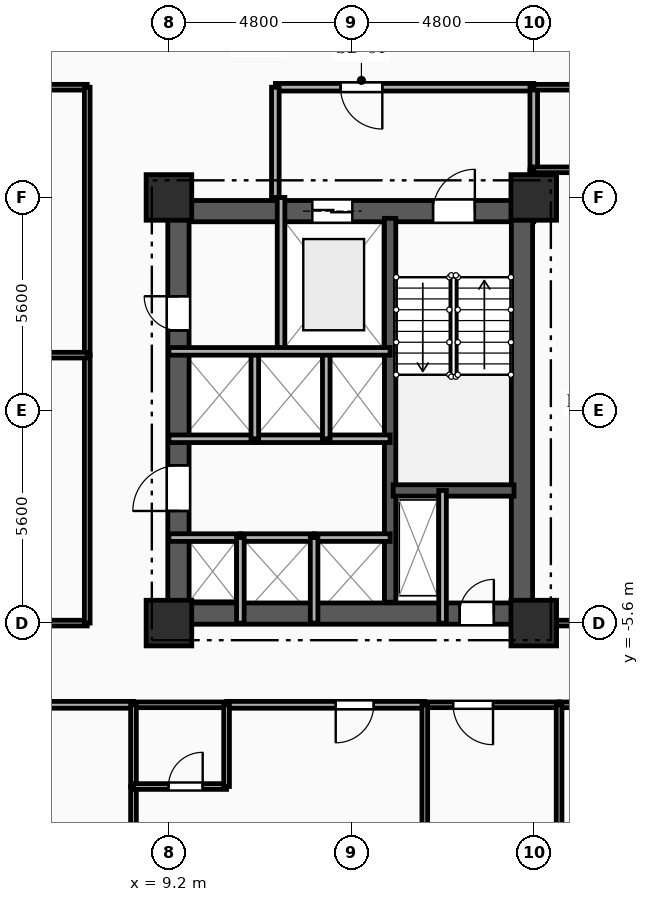
"""IFC4 building model, lengths in metres.
Left out: names, types, materials, properties, quantities, classifications, styles, units other than length and angle.
Written with IfcOpenShell. Run it as: python <this file> out.ifc"""

import sys

from ifc_helpers import new_model, si_unit, direction, frame, frame_2d, origin, origin_2d, place, context, subcontext, project, spatial, rectangle, extrude, element, fill, save


model = new_model("IFC4")
c1 = context("Model", 3, precision=1e-05, world=origin(), true_north=direction((0.0, 1.0)))
c2 = subcontext(c1, "Body", "Model", "MODEL_VIEW")
j1 = project(units=[si_unit("LENGTHUNIT", "METRE"), si_unit("PLANEANGLEUNIT", "RADIAN")], contexts=[c1])
p1 = place(None, origin())
s1 = spatial("IfcSite", under=j1, at=p1, CompositionType="ELEMENT")
p2 = place(p1, origin())
s2 = spatial("IfcBuilding", under=s1, at=p2, CompositionType="ELEMENT")
p3 = place(p2, frame((0.0, 0.0, 40.4)))
s3 = spatial("IfcBuildingStorey", under=s2, at=p3, CompositionType="ELEMENT", Elevation=40.4)
for number, where, z_axis, x_axis in (
    (1, (9.2, -5.6, 0.0), (0.0, 0.0, 1.0), (1.0, 0.0, 0.0)),
    (2, (9.2, 5.6, 0.0), (0.0, 0.0, 1.0), (1.0, 0.0, 0.0)),
    (3, (18.8, -5.6, 0.0), (0.0, 0.0, 1.0), (1.0, 0.0, 0.0)),
    (4, (18.8, 5.6, 0.0), (0.0, 0.0, 1.0), (1.0, 0.0, 0.0)),
):
    element("IfcColumn", number, at=place(p3, frame(where, z_axis=z_axis, x_axis=x_axis)), inside=s3, PredefinedType="COLUMN", context=c2, shape_type="SweptSolid", body=[
        extrude(rectangle(XDim=1.2, YDim=1.2, at=origin_2d()), origin(), (0.0, 0.0, 1.0), 3.35),
    ])
p4 = place(p3, frame((9.2, 5.24, 0.0), z_axis=(0.0, 0.0, 1.0), x_axis=(1.0, 0.0, 0.0)))
e5 = element("IfcWall", 5, at=p4, inside=s3, PredefinedType="SHEAR", context=c2, shape_type="SweptSolid", body=[
    extrude(rectangle(XDim=9.6, YDim=0.56, at=frame_2d((4.8, 0.0))), origin(), (0.0, 0.0, 1.0), 3.035),
])
p5 = place(p4, frame((6.95, 0.0, 0.0)))
e6 = element("IfcOpeningElement", 6, at=p5, cuts=e5, PredefinedType="OPENING", context=c2, shape_type="SweptSolid", body=[
    extrude(rectangle(XDim=1.1, YDim=2.15, at=frame_2d((0.55, 1.075))), frame((0.0, 0.29, 0.0), z_axis=(0.0, -1.0, 0.0), x_axis=(1.0, 0.0, 0.0)), (0.0, 0.0, 1.0), 0.58),
])
p6 = place(p4, frame((3.775, 0.0, 0.0)))
e7 = element("IfcOpeningElement", 7, at=p6, cuts=e5, PredefinedType="OPENING", context=c2, shape_type="SweptSolid", body=[
    extrude(rectangle(XDim=1.05, YDim=2.1, at=frame_2d((0.525, 1.05))), frame((0.0, 0.29, 0.0), z_axis=(0.0, -1.0, 0.0), x_axis=(1.0, 0.0, 0.0)), (0.0, 0.0, 1.0), 0.58),
])
p7 = place(p3, frame((9.2, -5.35, 0.0), z_axis=(0.0, 0.0, 1.0), x_axis=(1.0, 0.0, 0.0)))
e8 = element("IfcWall", 8, at=p7, inside=s3, PredefinedType="SHEAR", context=c2, shape_type="SweptSolid", body=[
    extrude(rectangle(XDim=9.6, YDim=0.56, at=frame_2d((4.8, 0.0))), origin(), (0.0, 0.0, 1.0), 3.035),
])
p8 = place(p7, frame((7.65, 0.0, 0.0)))
e9 = element("IfcOpeningElement", 9, at=p8, cuts=e8, PredefinedType="OPENING", context=c2, shape_type="SweptSolid", body=[
    extrude(rectangle(XDim=0.9, YDim=2.1, at=frame_2d((0.45, 1.05))), frame((0.0, 0.29, 0.0), z_axis=(0.0, -1.0, 0.0), x_axis=(1.0, 0.0, 0.0)), (0.0, 0.0, 1.0), 0.58),
])
p9 = place(p3, frame((9.45, -5.05, 0.0), z_axis=(0.0, 0.0, 1.0), x_axis=(0.0, 1.0, 0.0)))
e10 = element("IfcWall", 10, at=p9, inside=s3, PredefinedType="SHEAR", context=c2, shape_type="SweptSolid", body=[
    extrude(rectangle(XDim=10.1, YDim=0.56, at=frame_2d((5.05, 0.0))), origin(), (0.0, 0.0, 1.0), 3.035),
])
p10 = place(p9, frame((7.15, 0.0, 0.0)))
e11 = element("IfcOpeningElement", 11, at=p10, cuts=e10, PredefinedType="OPENING", context=c2, shape_type="SweptSolid", body=[
    extrude(rectangle(XDim=0.9, YDim=2.1, at=frame_2d((0.45, 1.05))), frame((0.0, 0.29, 0.0), z_axis=(0.0, -1.0, 0.0), x_axis=(1.0, 0.0, 0.0)), (0.0, 0.0, 1.0), 0.58),
])
p11 = place(p9, frame((2.4, 0.0, 0.0)))
e12 = element("IfcOpeningElement", 12, at=p11, cuts=e10, PredefinedType="OPENING", context=c2, shape_type="SweptSolid", body=[
    extrude(rectangle(XDim=1.2, YDim=2.15, at=frame_2d((0.6, 1.075))), frame((0.0, 0.29, 0.0), z_axis=(0.0, -1.0, 0.0), x_axis=(1.0, 0.0, 0.0)), (0.0, 0.0, 1.0), 0.58),
])
p12 = place(p3, frame((18.49, -5.05, 0.0), z_axis=(0.0, 0.0, 1.0), x_axis=(0.0, 1.0, 0.0)))
e13 = element("IfcWall", 13, at=p12, inside=s3, PredefinedType="SHEAR", context=c2, shape_type="SweptSolid", body=[
    extrude(rectangle(XDim=10.1, YDim=0.56, at=frame_2d((5.05, 0.0))), origin(), (0.0, 0.0, 1.0), 3.035),
])
p13 = place(p3, frame((15.02, -5.05, 0.0), z_axis=(0.0, 0.0, 1.0), x_axis=(0.0, 1.0, 0.0)))
e14 = element("IfcWall", 14, at=p13, inside=s3, PredefinedType="SHEAR", context=c2, shape_type="SweptSolid", body=[
    extrude(rectangle(XDim=10.1, YDim=0.3, at=frame_2d((5.05, 0.0))), origin(), (0.0, 0.0, 1.0), 3.035),
])
p14 = place(p3, frame((15.1, -2.11, 0.0), z_axis=(0.0, 0.0, 1.0), x_axis=(1.0, 0.0, 0.0)))
e15 = element("IfcWall", 15, at=p14, inside=s3, PredefinedType="SHEAR", context=c2, shape_type="SweptSolid", body=[
    extrude(rectangle(XDim=3.18, YDim=0.3, at=frame_2d((1.59, 0.0))), origin(), (0.0, 0.0, 1.0), 3.035),
])
p15 = place(p3, frame((16.4, -2.11, 0.0), z_axis=(0.0, 0.0, 1.0), x_axis=(0.0, -1.0, 0.0)))
e16 = element("IfcWall", 16, at=p15, inside=s3, PredefinedType="PARTITIONING", context=c2, shape_type="SweptSolid", body=[
    extrude(rectangle(XDim=3.49, YDim=0.2, at=frame_2d((1.745, 0.0))), origin(), (0.0, 0.0, 1.0), 3.035),
])
p16 = place(p3, frame((12.15, 5.6, 0.0), z_axis=(0.0, 0.0, 1.0), x_axis=(0.0, -1.0, 0.0)))
e17 = element("IfcWall", 17, at=p16, inside=s3, PredefinedType="PARTITIONING", context=c2, shape_type="SweptSolid", body=[
    extrude(rectangle(XDim=4.05, YDim=0.2, at=frame_2d((2.025, 0.0))), origin(), (0.0, 0.0, 1.0), 3.035),
])
p17 = place(p3, frame((18.8, 8.5, 0.0), z_axis=(0.0, 0.0, 1.0), x_axis=(-1.0, 0.0, 0.0)))
e18 = element("IfcWall", 18, at=p17, inside=s3, PredefinedType="PARTITIONING", context=c2, shape_type="SweptSolid", body=[
    extrude(rectangle(XDim=6.8, YDim=0.2, at=frame_2d((3.4, 0.0))), origin(), (0.0, 0.0, 1.0), 3.035),
])
p18 = place(p17, frame((3.985, 0.0, 0.0)))
e19 = element("IfcOpeningElement", 19, at=p18, cuts=e18, PredefinedType="OPENING", context=c2, shape_type="SweptSolid", body=[
    extrude(rectangle(XDim=1.1, YDim=2.15, at=frame_2d((0.55, 1.075))), frame((0.0, 0.11, 0.0), z_axis=(0.0, -1.0, 0.0), x_axis=(1.0, 0.0, 0.0)), (0.0, 0.0, 1.0), 0.22),
])
p19 = place(p3, frame((12.0, 8.5, 0.0), z_axis=(0.0, 0.0, 1.0), x_axis=(0.0, -1.0, 0.0)))
e20 = element("IfcWall", 20, at=p19, inside=s3, PredefinedType="PARTITIONING", context=c2, shape_type="SweptSolid", body=[
    extrude(rectangle(XDim=2.9, YDim=0.2, at=frame_2d((1.45, 0.0))), origin(), (0.0, 0.0, 1.0), 3.035),
])
p20 = place(p3, frame((18.8, 5.6, 0.0), z_axis=(0.0, 0.0, 1.0), x_axis=(0.0, 1.0, 0.0)))
e21 = element("IfcWall", 21, at=p20, inside=s3, PredefinedType="PARTITIONING", context=c2, shape_type="SweptSolid", body=[
    extrude(rectangle(XDim=0.727, YDim=0.2, at=frame_2d((0.363, 0.0))), origin(), (0.0, 0.0, 1.0), 2.52),
])
p21 = place(p3, frame((18.8, 6.327, 0.0), z_axis=(0.0, 0.0, 1.0), x_axis=(0.0, 1.0, 0.0)))
e22 = element("IfcWall", 22, at=p21, inside=s3, PredefinedType="PARTITIONING", context=c2, shape_type="SweptSolid", body=[
    extrude(rectangle(XDim=2.173, YDim=0.2, at=frame_2d((1.086, 0.0))), origin(), (0.0, 0.0, 1.0), 2.52),
])
p22 = place(p3, frame((9.2, -3.35, 0.0), z_axis=(0.0, 0.0, 1.0), x_axis=(1.0, 0.0, 0.0)))
e23 = element("IfcWall", 23, at=p22, inside=s3, PredefinedType="PARTITIONING", context=c2, shape_type="SweptSolid", body=[
    extrude(rectangle(XDim=1.88, YDim=0.2, at=frame_2d((0.94, 0.0))), origin(), (0.0, 0.0, 1.0), 2.75),
])
p23 = place(p3, frame((11.08, -3.35, 0.0), z_axis=(0.0, 0.0, 1.0), x_axis=(1.0, 0.0, 0.0)))
e24 = element("IfcWall", 24, at=p23, inside=s3, PredefinedType="PARTITIONING", context=c2, shape_type="SweptSolid", body=[
    extrude(rectangle(XDim=1.94, YDim=0.2, at=frame_2d((0.97, 0.0))), origin(), (0.0, 0.0, 1.0), 3.035),
])
p24 = place(p3, frame((13.02, -3.35, 0.0), z_axis=(0.0, 0.0, 1.0), x_axis=(1.0, 0.0, 0.0)))
e25 = element("IfcWall", 25, at=p24, inside=s3, PredefinedType="PARTITIONING", context=c2, shape_type="SweptSolid", body=[
    extrude(rectangle(XDim=2.0, YDim=0.2, at=frame_2d((1.0, 0.0))), origin(), (0.0, 0.0, 1.0), 3.035),
])
p25 = place(p3, frame((11.46, -0.75, 0.0), z_axis=(0.0, 0.0, 1.0), x_axis=(-1.0, 0.0, 0.0)))
e26 = element("IfcWall", 26, at=p25, inside=s3, PredefinedType="PARTITIONING", context=c2, shape_type="SweptSolid", body=[
    extrude(rectangle(XDim=2.26, YDim=0.2, at=frame_2d((1.13, 0.0))), origin(), (0.0, 0.0, 1.0), 3.035),
])
p26 = place(p3, frame((13.34, -0.75, 0.0), z_axis=(0.0, 0.0, 1.0), x_axis=(-1.0, 0.0, 0.0)))
e27 = element("IfcWall", 27, at=p26, inside=s3, PredefinedType="PARTITIONING", context=c2, shape_type="SweptSolid", body=[
    extrude(rectangle(XDim=1.88, YDim=0.2, at=frame_2d((0.94, 0.0))), origin(), (0.0, 0.0, 1.0), 3.035),
])
p27 = place(p3, frame((15.02, -0.75, 0.0), z_axis=(0.0, 0.0, 1.0), x_axis=(-1.0, 0.0, 0.0)))
e28 = element("IfcWall", 28, at=p27, inside=s3, PredefinedType="PARTITIONING", context=c2, shape_type="SweptSolid", body=[
    extrude(rectangle(XDim=1.68, YDim=0.2, at=frame_2d((0.84, 0.0))), origin(), (0.0, 0.0, 1.0), 3.035),
])
for number, where, z_axis, x_axis in (
    (29, (11.08, -5.6, 0.0), (0.0, 0.0, 1.0), (0.0, 1.0, 0.0)),
    (30, (13.02, -5.6, 0.0), (0.0, 0.0, 1.0), (0.0, 1.0, 0.0)),
):
    element("IfcWall", number, at=place(p3, frame(where, z_axis=z_axis, x_axis=x_axis)), inside=s3, PredefinedType="PARTITIONING", context=c2, shape_type="SweptSolid", body=[
        extrude(rectangle(XDim=2.25, YDim=0.2, at=frame_2d((1.125, 0.0))), origin(), (0.0, 0.0, 1.0), 3.035),
    ])
for number, where, z_axis, x_axis in (
    (31, (11.46, -0.75, 0.0), (0.0, 0.0, 1.0), (0.0, 1.0, 0.0)),
    (32, (13.34, -0.75, 0.0), (0.0, 0.0, 1.0), (0.0, 1.0, 0.0)),
):
    element("IfcWall", number, at=place(p3, frame(where, z_axis=z_axis, x_axis=x_axis)), inside=s3, PredefinedType="PARTITIONING", context=c2, shape_type="SweptSolid", body=[
        extrude(rectangle(XDim=2.3, YDim=0.2, at=frame_2d((1.15, 0.0))), origin(), (0.0, 0.0, 1.0), 3.035),
    ])
p28 = place(p3, frame((23.0, 8.5, 0.0), z_axis=(0.0, 0.0, 1.0), x_axis=(-1.0, 0.0, 0.0)))
e33 = element("IfcWall", 33, at=p28, inside=s3, PredefinedType="PARTITIONING", context=c2, shape_type="SweptSolid", body=[
    extrude(rectangle(XDim=4.2, YDim=0.15, at=frame_2d((2.1, 0.0))), origin(), (0.0, 0.0, 1.0), 3.035),
])
p29 = place(p28, frame((0.829, 0.0, 0.0)))
e34 = element("IfcOpeningElement", 34, at=p29, cuts=e33, PredefinedType="OPENING", context=c2, shape_type="SweptSolid", body=[
    extrude(rectangle(XDim=1.05, YDim=2.15, at=frame_2d((0.525, 1.075))), frame((0.0, 0.085, 0.0), z_axis=(0.0, -1.0, 0.0), x_axis=(1.0, 0.0, 0.0)), (0.0, 0.0, 1.0), 0.17),
])
p30 = place(p3, frame((7.05, 8.5, 0.0), z_axis=(0.0, 0.0, 1.0), x_axis=(-1.0, 0.0, 0.0)))
e35 = element("IfcWall", 35, at=p30, inside=s3, PredefinedType="PARTITIONING", context=c2, shape_type="SweptSolid", body=[
    extrude(rectangle(XDim=7.05, YDim=0.15, at=frame_2d((3.525, 0.0))), origin(), (0.0, 0.0, 1.0), 3.035),
])
p31 = place(p3, frame((18.8, -5.6, 0.0), z_axis=(0.0, 0.0, 1.0), x_axis=(1.0, 0.0, 0.0)))
e36 = element("IfcWall", 36, at=p31, inside=s3, PredefinedType="PARTITIONING", context=c2, shape_type="SweptSolid", body=[
    extrude(rectangle(XDim=4.2, YDim=0.15, at=frame_2d((2.1, 0.0))), origin(), (0.0, 0.0, 1.0), 3.035),
])
p32 = place(p31, frame((2.321, 0.0, 0.0)))
e37 = element("IfcOpeningElement", 37, at=p32, cuts=e36, PredefinedType="OPENING", context=c2, shape_type="SweptSolid", body=[
    extrude(rectangle(XDim=1.05, YDim=2.15, at=frame_2d((0.525, 1.075))), frame((0.0, 0.085, 0.0), z_axis=(0.0, -1.0, 0.0), x_axis=(1.0, 0.0, 0.0)), (0.0, 0.0, 1.0), 0.17),
])
p33 = place(p3, frame((8.267, -7.75, 0.0), z_axis=(0.0, 0.0, 1.0), x_axis=(-1.0, 0.0, 0.0)))
e38 = element("IfcWall", 38, at=p33, inside=s3, PredefinedType="PARTITIONING", context=c2, shape_type="SweptSolid", body=[
    extrude(rectangle(XDim=5.217, YDim=0.18, at=frame_2d((2.608, 0.0))), origin(), (0.0, 0.0, 1.0), 3.035),
])
p34 = place(p33, frame((3.255, 0.0, 0.0)))
e39 = element("IfcOpeningElement", 39, at=p34, cuts=e38, PredefinedType="OPENING", context=c2, shape_type="SweptSolid", body=[
    extrude(rectangle(XDim=1.0, YDim=2.15, at=frame_2d((0.5, 1.075))), frame((0.0, 0.1, 0.0), z_axis=(0.0, -1.0, 0.0), x_axis=(1.0, 0.0, 0.0)), (0.0, 0.0, 1.0), 0.2),
])
p35 = place(p3, frame((15.933, -7.75, 0.0), z_axis=(0.0, 0.0, 1.0), x_axis=(-1.0, 0.0, 0.0)))
e40 = element("IfcWall", 40, at=p35, inside=s3, PredefinedType="PARTITIONING", context=c2, shape_type="SweptSolid", body=[
    extrude(rectangle(XDim=5.216, YDim=0.18, at=frame_2d((2.608, 0.0))), origin(), (0.0, 0.0, 1.0), 3.035),
])
p36 = place(p35, frame((1.344, 0.0, 0.0)))
e41 = element("IfcOpeningElement", 41, at=p36, cuts=e40, PredefinedType="OPENING", context=c2, shape_type="SweptSolid", body=[
    extrude(rectangle(XDim=1.0, YDim=2.15, at=frame_2d((0.5, 1.075))), frame((0.0, 0.1, 0.0), z_axis=(0.0, -1.0, 0.0), x_axis=(1.0, 0.0, 0.0)), (0.0, 0.0, 1.0), 0.2),
])
p37 = place(p3, frame((10.717, -7.75, 0.0), z_axis=(0.0, 0.0, 1.0), x_axis=(-1.0, 0.0, 0.0)))
e42 = element("IfcWall", 42, at=p37, inside=s3, PredefinedType="PLUMBINGWALL", context=c2, shape_type="SweptSolid", body=[
    extrude(rectangle(XDim=2.45, YDim=0.15, at=frame_2d((1.225, 0.0))), origin(), (0.0, 0.0, 1.0), 3.035),
])
p38 = place(p3, frame((19.467, -7.75, 0.0), z_axis=(0.0, 0.0, 1.0), x_axis=(-1.0, 0.0, 0.0)))
e43 = element("IfcWall", 43, at=p38, inside=s3, PredefinedType="PARTITIONING", context=c2, shape_type="SweptSolid", body=[
    extrude(rectangle(XDim=3.533, YDim=0.15, at=frame_2d((1.767, 0.0))), origin(), (0.0, 0.0, 1.0), 3.035),
])
p39 = place(p38, frame((1.738, 0.0, 0.0)))
e44 = element("IfcOpeningElement", 44, at=p39, cuts=e43, PredefinedType="OPENING", context=c2, shape_type="SweptSolid", body=[
    extrude(rectangle(XDim=1.05, YDim=2.15, at=frame_2d((0.525, 1.075))), frame((0.0, 0.085, 0.0), z_axis=(0.0, -1.0, 0.0), x_axis=(1.0, 0.0, 0.0)), (0.0, 0.0, 1.0), 0.17),
])
p40 = place(p3, frame((23.0, -7.75, 0.0), z_axis=(0.0, 0.0, 1.0), x_axis=(-1.0, 0.0, 0.0)))
e45 = element("IfcWall", 45, at=p40, inside=s3, PredefinedType="PARTITIONING", context=c2, shape_type="SweptSolid", body=[
    extrude(rectangle(XDim=3.533, YDim=0.15, at=frame_2d((1.767, 0.0))), origin(), (0.0, 0.0, 1.0), 3.035),
])
p41 = place(p40, frame((0.745, 0.0, 0.0)))
e46 = element("IfcOpeningElement", 46, at=p41, cuts=e45, PredefinedType="OPENING", context=c2, shape_type="SweptSolid", body=[
    extrude(rectangle(XDim=1.05, YDim=2.15, at=frame_2d((0.525, 1.075))), frame((0.0, 0.085, 0.0), z_axis=(0.0, -1.0, 0.0), x_axis=(1.0, 0.0, 0.0)), (0.0, 0.0, 1.0), 0.17),
])
p42 = place(p3, frame((0.0, -5.6, 0.0), z_axis=(0.0, 0.0, 1.0), x_axis=(1.0, 0.0, 0.0)))
e47 = element("IfcWall", 47, at=p42, inside=s3, PredefinedType="PARTITIONING", context=c2, shape_type="SweptSolid", body=[
    extrude(rectangle(XDim=7.05, YDim=0.15, at=frame_2d((3.525, 0.0))), origin(), (0.0, 0.0, 1.0), 2.52),
])
for number, where, z_axis, x_axis in (
    (48, (7.05, -5.6, 0.0), (0.0, 0.0, 1.0), (0.0, 1.0, 0.0)),
    (49, (7.05, 1.45, 0.0), (0.0, 0.0, 1.0), (0.0, 1.0, 0.0)),
):
    element("IfcWall", number, at=place(p3, frame(where, z_axis=z_axis, x_axis=x_axis)), inside=s3, PredefinedType="PARTITIONING", context=c2, shape_type="SweptSolid", body=[
        extrude(rectangle(XDim=7.05, YDim=0.15, at=frame_2d((3.525, 0.0))), origin(), (0.0, 0.0, 1.0), 3.035),
    ])
p43 = place(p3, frame((18.8, 6.327, 0.0), z_axis=(0.0, 0.0, 1.0), x_axis=(1.0, 0.0, 0.0)))
e50 = element("IfcWall", 50, at=p43, inside=s3, PredefinedType="PARTITIONING", context=c2, shape_type="SweptSolid", body=[
    extrude(rectangle(XDim=6.79, YDim=0.15, at=frame_2d((3.395, 0.0))), origin(), (0.0, 0.0, 1.0), 3.035),
])
p44 = place(p3, frame((8.267, -9.9, 0.0), z_axis=(0.0, 0.0, 1.0), x_axis=(0.0, -1.0, 0.0)))
e51 = element("IfcWall", 51, at=p44, inside=s3, PredefinedType="PARTITIONING", context=c2, shape_type="SweptSolid", body=[
    extrude(rectangle(XDim=9.5, YDim=0.15, at=frame_2d((4.75, 0.0))), origin(), (0.0, 0.0, 1.0), 3.035),
])
p45 = place(p3, frame((8.267, -7.75, 0.0), z_axis=(0.0, 0.0, 1.0), x_axis=(0.0, -1.0, 0.0)))
e52 = element("IfcWall", 52, at=p45, inside=s3, PredefinedType="PLUMBINGWALL", context=c2, shape_type="SweptSolid", body=[
    extrude(rectangle(XDim=2.15, YDim=0.15, at=frame_2d((1.075, 0.0))), origin(), (0.0, 0.0, 1.0), 3.035),
])
p46 = place(p3, frame((8.267, -9.9, 0.0), z_axis=(0.0, 0.0, 1.0), x_axis=(1.0, 0.0, 0.0)))
e53 = element("IfcWall", 53, at=p46, inside=s3, PredefinedType="PLUMBINGWALL", context=c2, shape_type="SweptSolid", body=[
    extrude(rectangle(XDim=2.45, YDim=0.15, at=frame_2d((1.225, 0.0))), origin(), (0.0, 0.0, 1.0), 3.035),
])
p47 = place(p46, frame((0.921, 0.0, 0.0)))
e54 = element("IfcOpeningElement", 54, at=p47, cuts=e53, PredefinedType="OPENING", context=c2, shape_type="SweptSolid", body=[
    extrude(rectangle(XDim=0.9, YDim=2.1, at=frame_2d((0.45, 1.05))), frame((0.0, 0.085, 0.0), z_axis=(0.0, -1.0, 0.0), x_axis=(1.0, 0.0, 0.0)), (0.0, 0.0, 1.0), 0.17),
])
p48 = place(p3, frame((10.717, -9.9, 0.0), z_axis=(0.0, 0.0, 1.0), x_axis=(0.0, 1.0, 0.0)))
e55 = element("IfcWall", 55, at=p48, inside=s3, PredefinedType="PLUMBINGWALL", context=c2, shape_type="SweptSolid", body=[
    extrude(rectangle(XDim=2.15, YDim=0.15, at=frame_2d((1.075, 0.0))), origin(), (0.0, 0.0, 1.0), 3.035),
])
for number, where, z_axis, x_axis in (
    (56, (15.933, -7.75, 0.0), (0.0, 0.0, 1.0), (0.0, -1.0, 0.0)),
    (57, (19.467, -7.75, 0.0), (0.0, 0.0, 1.0), (0.0, -1.0, 0.0)),
):
    element("IfcWall", number, at=place(p3, frame(where, z_axis=z_axis, x_axis=x_axis)), inside=s3, PredefinedType="PARTITIONING", context=c2, shape_type="SweptSolid", body=[
        extrude(rectangle(XDim=11.65, YDim=0.15, at=frame_2d((5.825, 0.0))), origin(), (0.0, 0.0, 1.0), 3.035),
    ])
p49 = place(p3, frame((-7.05, 1.45, 0.0), z_axis=(0.0, 0.0, 1.0), x_axis=(1.0, 0.0, 0.0)))
e58 = element("IfcWall", 58, at=p49, inside=s3, PredefinedType="PARTITIONING", context=c2, shape_type="SweptSolid", body=[
    extrude(rectangle(XDim=14.1, YDim=0.15, at=frame_2d((7.05, 0.0))), origin(), (0.0, 0.0, 1.0), 3.035),
])
p50 = place(p3, frame((9.2, 1.55, 0.0), z_axis=(0.0, 0.0, 1.0), x_axis=(1.0, 0.0, 0.0)))
e59 = element("IfcWall", 59, at=p50, inside=s3, PredefinedType="PARTITIONING", context=c2, shape_type="SweptSolid", body=[
    extrude(rectangle(XDim=5.82, YDim=0.2, at=frame_2d((2.91, 0.0))), origin(), (0.0, 0.0, 1.0), 3.035),
])
p51 = place(p5, origin())
e60 = element("IfcDoor", 60, at=p51, inside=s3, OperationType="SINGLE_SWING_RIGHT", PredefinedType="DOOR", context=c2, shape_type="SweptSolid", body=[
    extrude(rectangle(XDim=1.1, YDim=2.15, at=frame_2d((0.55, 1.075))), frame((0.0, 0.025, 0.0), z_axis=(0.0, -1.0, 0.0), x_axis=(1.0, 0.0, 0.0)), (0.0, 0.0, 1.0), 0.05),
])
fill(e6, e60)
p52 = place(p6, origin())
e61 = element("IfcDoor", 61, at=p52, inside=s3, OperationType="DOUBLE_DOOR_SLIDING", PredefinedType="DOOR", context=c2, shape_type="SweptSolid", body=[
    extrude(rectangle(XDim=1.05, YDim=2.1, at=frame_2d((0.525, 1.05))), frame((0.0, 0.025, 0.0), z_axis=(0.0, -1.0, 0.0), x_axis=(1.0, 0.0, 0.0)), (0.0, 0.0, 1.0), 0.05),
])
fill(e7, e61)
p53 = place(p8, origin())
e62 = element("IfcDoor", 62, at=p53, inside=s3, OperationType="SINGLE_SWING_RIGHT", PredefinedType="DOOR", context=c2, shape_type="SweptSolid", body=[
    extrude(rectangle(XDim=0.9, YDim=2.1, at=frame_2d((0.45, 1.05))), frame((0.0, 0.025, 0.0), z_axis=(0.0, -1.0, 0.0), x_axis=(1.0, 0.0, 0.0)), (0.0, 0.0, 1.0), 0.05),
])
fill(e9, e62)
p54 = place(p18, origin())
e63 = element("IfcDoor", 63, at=p54, inside=s3, OperationType="SINGLE_SWING_LEFT", PredefinedType="DOOR", context=c2, shape_type="SweptSolid", body=[
    extrude(rectangle(XDim=1.1, YDim=2.15, at=frame_2d((0.55, 1.075))), frame((0.0, 0.025, 0.0), z_axis=(0.0, -1.0, 0.0), x_axis=(1.0, 0.0, 0.0)), (0.0, 0.0, 1.0), 0.05),
])
fill(e19, e63)
p55 = place(p10, origin())
e64 = element("IfcDoor", 64, at=p55, inside=s3, OperationType="SINGLE_SWING_RIGHT", PredefinedType="DOOR", context=c2, shape_type="SweptSolid", body=[
    extrude(rectangle(XDim=0.9, YDim=2.1, at=frame_2d((0.45, 1.05))), frame((0.0, 0.025, 0.0), z_axis=(0.0, -1.0, 0.0), x_axis=(1.0, 0.0, 0.0)), (0.0, 0.0, 1.0), 0.05),
])
fill(e11, e64)
p56 = place(p11, origin())
e65 = element("IfcDoor", 65, at=p56, inside=s3, OperationType="SINGLE_SWING_LEFT", PredefinedType="DOOR", context=c2, shape_type="SweptSolid", body=[
    extrude(rectangle(XDim=1.2, YDim=2.15, at=frame_2d((0.6, 1.075))), frame((0.0, 0.025, 0.0), z_axis=(0.0, -1.0, 0.0), x_axis=(1.0, 0.0, 0.0)), (0.0, 0.0, 1.0), 0.05),
])
fill(e12, e65)
p57 = place(p36, origin())
e66 = element("IfcDoor", 66, at=p57, inside=s3, OperationType="SINGLE_SWING_RIGHT", PredefinedType="DOOR", context=c2, shape_type="SweptSolid", body=[
    extrude(rectangle(XDim=1.0, YDim=2.15, at=frame_2d((0.5, 1.075))), frame((0.0, 0.025, 0.0), z_axis=(0.0, -1.0, 0.0), x_axis=(1.0, 0.0, 0.0)), (0.0, 0.0, 1.0), 0.05),
])
fill(e41, e66)
p58 = place(p39, origin())
e67 = element("IfcDoor", 67, at=p58, inside=s3, OperationType="SINGLE_SWING_LEFT", PredefinedType="DOOR", context=c2, shape_type="SweptSolid", body=[
    extrude(rectangle(XDim=1.05, YDim=2.15, at=frame_2d((0.525, 1.075))), frame((0.0, 0.025, 0.0), z_axis=(0.0, -1.0, 0.0), x_axis=(1.0, 0.0, 0.0)), (0.0, 0.0, 1.0), 0.05),
])
fill(e44, e67)
p59 = place(p47, origin())
e68 = element("IfcDoor", 68, at=p59, inside=s3, OperationType="SINGLE_SWING_RIGHT", PredefinedType="DOOR", context=c2, shape_type="SweptSolid", body=[
    extrude(rectangle(XDim=0.9, YDim=2.1, at=frame_2d((0.45, 1.05))), frame((0.0, 0.025, 0.0), z_axis=(0.0, -1.0, 0.0), x_axis=(1.0, 0.0, 0.0)), (0.0, 0.0, 1.0), 0.05),
])
fill(e54, e68)
save(model, sys.argv[1])
